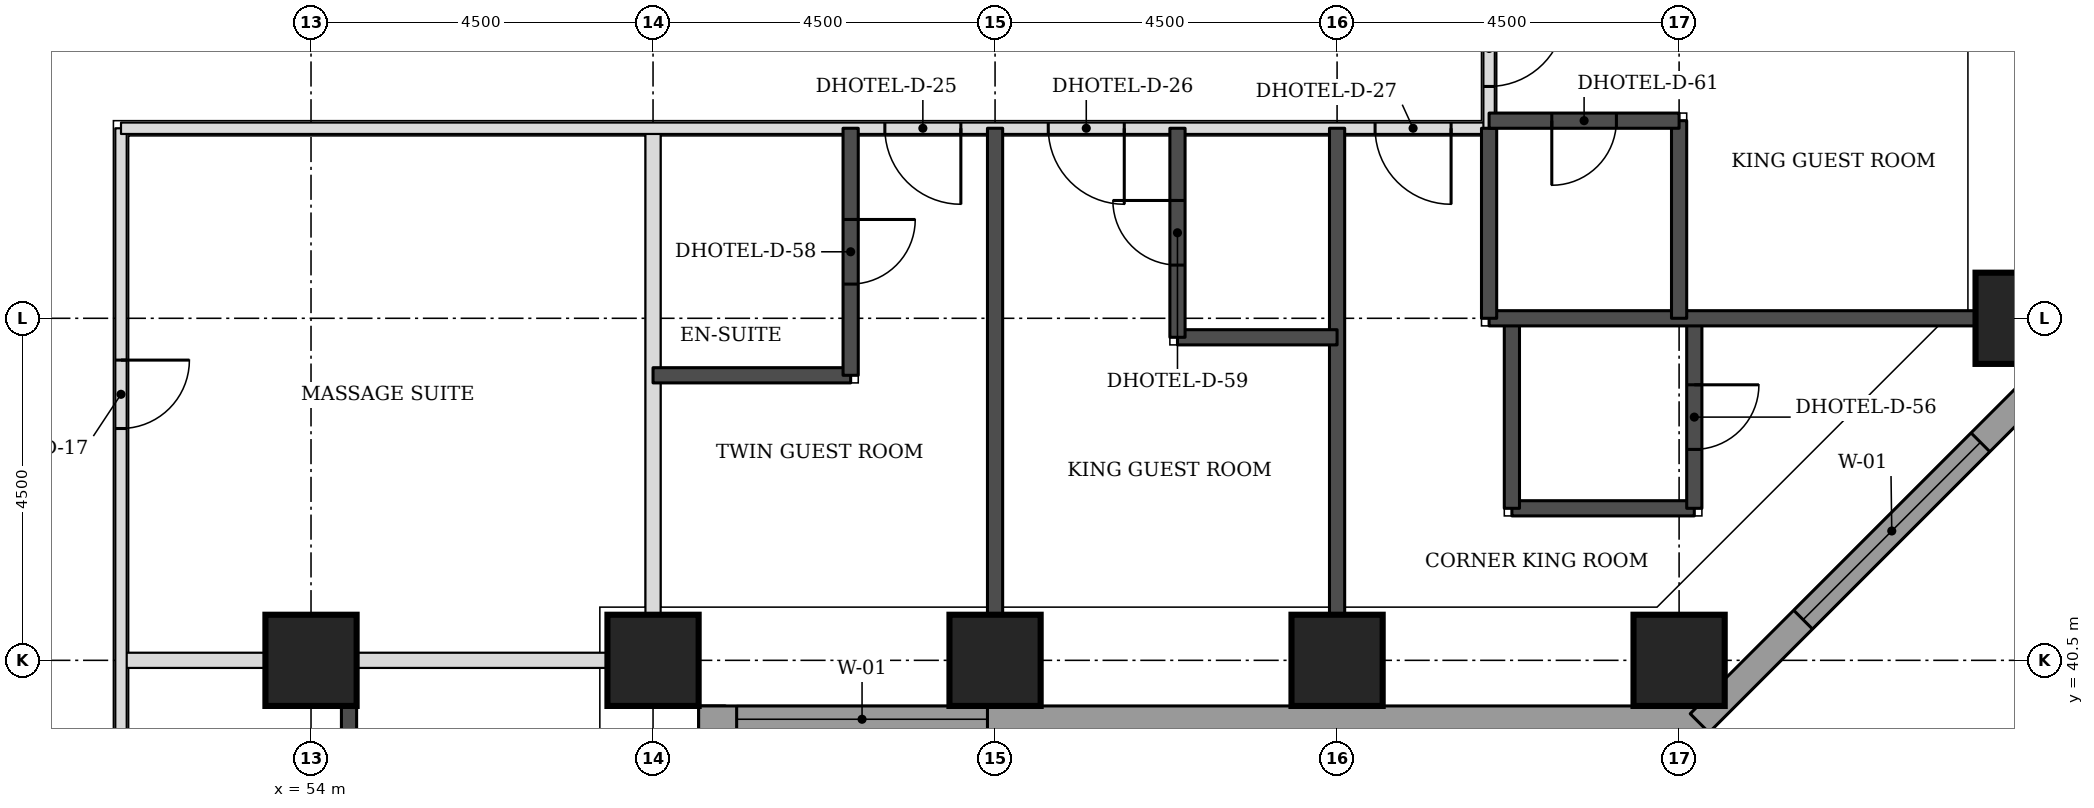
"""IFC4 building model, lengths in metres.
Left out: names, types, materials, properties, quantities, classifications, styles, units other than length and angle.
Written with IfcOpenShell. Run it as: python <this file> out.ifc"""

import sys

from ifc_helpers import new_model, si_unit, direction, frame, frame_2d, origin, origin_2d, place, context, subcontext, project, spatial, rectangle, extrude, element, fill, save


model = new_model("IFC4")
c1 = context("Model", 3, precision=1e-05, world=origin(), true_north=direction((0.0, 1.0)))
c2 = subcontext(c1, "Body", "Model", "MODEL_VIEW")
j1 = project(units=[si_unit("LENGTHUNIT", "METRE"), si_unit("PLANEANGLEUNIT", "RADIAN")], contexts=[c1])
p1 = place(None, origin())
s1 = spatial("IfcSite", under=j1, at=p1, CompositionType="ELEMENT")
p2 = place(p1, origin())
s2 = spatial("IfcBuilding", under=s1, at=p2, CompositionType="ELEMENT")
p3 = place(p2, frame((0.0, 0.0, 59.4)))
s3 = spatial("IfcBuildingStorey", under=s2, at=p3, CompositionType="ELEMENT", Elevation=59.4)
for number, where, z_axis, x_axis in (
    (1, (54.0, 40.5, 0.0), (0.0, 0.0, 1.0), (1.0, 0.0, 0.0)),
    (2, (58.5, 40.5, 0.0), (0.0, 0.0, 1.0), (1.0, 0.0, 0.0)),
    (3, (63.0, 40.5, 0.0), (0.0, 0.0, 1.0), (1.0, 0.0, 0.0)),
    (4, (67.5, 40.5, 0.0), (0.0, 0.0, 1.0), (1.0, 0.0, 0.0)),
    (5, (72.0, 40.5, 0.0), (0.0, 0.0, 1.0), (1.0, 0.0, 0.0)),
    (6, (76.5, 45.0, 0.0), (0.0, 0.0, 1.0), (1.0, 0.0, 0.0)),
):
    element("IfcColumn", number, at=place(p3, frame(where, z_axis=z_axis, x_axis=x_axis)), inside=s3, PredefinedType="COLUMN", context=c2, shape_type="SweptSolid", body=[
        extrude(rectangle(XDim=1.2, YDim=1.2, at=origin_2d()), origin(), (0.0, 0.0, 1.0), 3.3),
    ])
p4 = place(p3, frame((59.275, 22.106, 0.0), z_axis=(0.0, 0.0, 1.0), x_axis=(0.0, 1.0, 0.0)))
e7 = element("IfcWall", 7, at=p4, inside=s3, PredefinedType="STANDARD", context=c2, shape_type="SweptSolid", body=[
    extrude(rectangle(XDim=17.793, YDim=0.35, at=frame_2d((8.897, 0.0))), origin(), (0.0, 0.0, 1.0), 3.055),
])
p5 = place(p4, frame((5.493, 0.0, 0.8)))
e8 = element("IfcOpeningElement", 8, at=p5, cuts=e7, PredefinedType="OPENING", context=c2, shape_type="SweptSolid", body=[
    extrude(rectangle(XDim=3.3, YDim=1.5, at=frame_2d((1.65, 0.75))), frame((0.0, 0.185, 0.0), z_axis=(0.0, -1.0, 0.0), x_axis=(1.0, 0.0, 0.0)), (0.0, 0.0, 1.0), 0.37),
])
p6 = place(p4, frame((13.993, 0.0, 0.8)))
e9 = element("IfcOpeningElement", 9, at=p6, cuts=e7, PredefinedType="OPENING", context=c2, shape_type="SweptSolid", body=[
    extrude(rectangle(XDim=3.3, YDim=1.5, at=frame_2d((1.65, 0.75))), frame((0.0, 0.185, 0.0), z_axis=(0.0, -1.0, 0.0), x_axis=(1.0, 0.0, 0.0)), (0.0, 0.0, 1.0), 0.37),
])
p7 = place(p3, frame((59.1, 39.725, 0.0), z_axis=(0.0, 0.0, 1.0), x_axis=(1.0, 0.0, 0.0)))
e10 = element("IfcWall", 10, at=p7, inside=s3, PredefinedType="STANDARD", context=c2, shape_type="SweptSolid", body=[
    extrude(rectangle(XDim=13.293, YDim=0.35, at=frame_2d((6.647, 0.0))), origin(), (0.0, 0.0, 1.0), 3.055),
])
p8 = place(p7, frame((0.5, 0.0, 0.8)))
e11 = element("IfcOpeningElement", 11, at=p8, cuts=e10, PredefinedType="OPENING", context=c2, shape_type="SweptSolid", body=[
    extrude(rectangle(XDim=3.3, YDim=1.5, at=frame_2d((1.65, 0.75))), frame((0.0, 0.185, 0.0), z_axis=(0.0, -1.0, 0.0), x_axis=(1.0, 0.0, 0.0)), (0.0, 0.0, 1.0), 0.37),
])
p9 = place(p3, frame((72.27, 39.674, 0.0), z_axis=(0.0, 0.0, 1.0), x_axis=(0.707106781187, 0.707106781187, 0.0)))
e12 = element("IfcWall", 12, at=p9, inside=s3, PredefinedType="STANDARD", context=c2, shape_type="SweptSolid", body=[
    extrude(rectangle(XDim=7.151, YDim=0.35, at=frame_2d((3.576, 0.0))), origin(), (0.0, 0.0, 1.0), 3.055),
])
p10 = place(p9, frame((1.926, 0.0, 0.8)))
e13 = element("IfcOpeningElement", 13, at=p10, cuts=e12, PredefinedType="OPENING", context=c2, shape_type="SweptSolid", body=[
    extrude(rectangle(XDim=3.3, YDim=1.5, at=frame_2d((1.65, 0.75))), frame((0.0, 0.185, 0.0), z_axis=(0.0, -1.0, 0.0), x_axis=(1.0, 0.0, 0.0)), (0.0, 0.0, 1.0), 0.37),
])
p11 = place(p3, frame((51.5, 40.5, 0.0), z_axis=(0.0, 0.0, 1.0), x_axis=(1.0, 0.0, 0.0)))
e14 = element("IfcWall", 14, at=p11, inside=s3, PredefinedType="PARTITIONING", context=c2, shape_type="SweptSolid", body=[
    extrude(rectangle(XDim=6.4, YDim=0.2, at=frame_2d((3.2, 0.0))), origin(), (0.0, 0.0, 1.0), 2.33),
])
p12 = place(p3, frame((58.5, 41.1, 0.0), z_axis=(0.0, 0.0, 1.0), x_axis=(0.0, 1.0, 0.0)))
e15 = element("IfcWall", 15, at=p12, inside=s3, PredefinedType="PARTITIONING", context=c2, shape_type="SweptSolid", body=[
    extrude(rectangle(XDim=6.4, YDim=0.2, at=frame_2d((3.2, 0.0))), origin(), (0.0, 0.0, 1.0), 3.08),
])
p13 = place(p3, frame((51.5, 25.15, 0.0), z_axis=(0.0, 0.0, 1.0), x_axis=(0.0, 1.0, 0.0)))
e16 = element("IfcWall", 16, at=p13, inside=s3, PredefinedType="PARTITIONING", context=c2, shape_type="SweptSolid", body=[
    extrude(rectangle(XDim=22.35, YDim=0.15, at=frame_2d((11.175, 0.0))), origin(), (0.0, 0.0, 1.0), 3.08),
])
p14 = place(p13, frame((0.347, 0.0, 0.0)))
e17 = element("IfcOpeningElement", 17, at=p14, cuts=e16, PredefinedType="OPENING", context=c2, shape_type="SweptSolid", body=[
    extrude(rectangle(XDim=1.0, YDim=2.1, at=frame_2d((0.5, 1.05))), frame((0.0, 0.085, 0.0), z_axis=(0.0, -1.0, 0.0), x_axis=(1.0, 0.0, 0.0)), (0.0, 0.0, 1.0), 0.17),
])
p15 = place(p13, frame((2.3, 0.0, 0.0)))
e18 = element("IfcOpeningElement", 18, at=p15, cuts=e16, PredefinedType="OPENING", context=c2, shape_type="SweptSolid", body=[
    extrude(rectangle(XDim=1.0, YDim=2.1, at=frame_2d((0.5, 1.05))), frame((0.0, 0.085, 0.0), z_axis=(0.0, -1.0, 0.0), x_axis=(1.0, 0.0, 0.0)), (0.0, 0.0, 1.0), 0.17),
])
p16 = place(p13, frame((9.15, 0.0, 0.0)))
e19 = element("IfcOpeningElement", 19, at=p16, cuts=e16, PredefinedType="OPENING", context=c2, shape_type="SweptSolid", body=[
    extrude(rectangle(XDim=1.0, YDim=2.1, at=frame_2d((0.5, 1.05))), frame((0.0, 0.085, 0.0), z_axis=(0.0, -1.0, 0.0), x_axis=(1.0, 0.0, 0.0)), (0.0, 0.0, 1.0), 0.17),
])
p17 = place(p13, frame((11.3, 0.0, 0.0)))
e20 = element("IfcOpeningElement", 20, at=p17, cuts=e16, PredefinedType="OPENING", context=c2, shape_type="SweptSolid", body=[
    extrude(rectangle(XDim=1.0, YDim=2.1, at=frame_2d((0.5, 1.05))), frame((0.0, 0.085, 0.0), z_axis=(0.0, -1.0, 0.0), x_axis=(1.0, 0.0, 0.0)), (0.0, 0.0, 1.0), 0.17),
])
p18 = place(p13, frame((18.4, 0.0, 0.0)))
e21 = element("IfcOpeningElement", 21, at=p18, cuts=e16, PredefinedType="OPENING", context=c2, shape_type="SweptSolid", body=[
    extrude(rectangle(XDim=0.9, YDim=2.1, at=frame_2d((0.45, 1.05))), frame((0.0, 0.085, 0.0), z_axis=(0.0, -1.0, 0.0), x_axis=(1.0, 0.0, 0.0)), (0.0, 0.0, 1.0), 0.17),
])
p19 = place(p3, frame((51.5, 47.5, 0.0), z_axis=(0.0, 0.0, 1.0), x_axis=(1.0, 0.0, 0.0)))
e22 = element("IfcWall", 22, at=p19, inside=s3, PredefinedType="PARTITIONING", context=c2, shape_type="SweptSolid", body=[
    extrude(rectangle(XDim=18.0, YDim=0.15, at=frame_2d((9.0, 0.0))), origin(), (0.0, 0.0, 1.0), 3.08),
])
p20 = place(p19, frame((12.2, 0.0, 0.0)))
e23 = element("IfcOpeningElement", 23, at=p20, cuts=e22, PredefinedType="OPENING", context=c2, shape_type="SweptSolid", body=[
    extrude(rectangle(XDim=1.0, YDim=2.1, at=frame_2d((0.5, 1.05))), frame((0.0, 0.085, 0.0), z_axis=(0.0, -1.0, 0.0), x_axis=(1.0, 0.0, 0.0)), (0.0, 0.0, 1.0), 0.17),
])
p21 = place(p19, frame((10.05, 0.0, 0.0)))
e24 = element("IfcOpeningElement", 24, at=p21, cuts=e22, PredefinedType="OPENING", context=c2, shape_type="SweptSolid", body=[
    extrude(rectangle(XDim=1.0, YDim=2.1, at=frame_2d((0.5, 1.05))), frame((0.0, 0.085, 0.0), z_axis=(0.0, -1.0, 0.0), x_axis=(1.0, 0.0, 0.0)), (0.0, 0.0, 1.0), 0.17),
])
p22 = place(p19, frame((16.5, 0.0, 0.0)))
e25 = element("IfcOpeningElement", 25, at=p22, cuts=e22, PredefinedType="OPENING", context=c2, shape_type="SweptSolid", body=[
    extrude(rectangle(XDim=1.0, YDim=2.1, at=frame_2d((0.5, 1.05))), frame((0.0, 0.085, 0.0), z_axis=(0.0, -1.0, 0.0), x_axis=(1.0, 0.0, 0.0)), (0.0, 0.0, 1.0), 0.17),
])
p23 = place(p3, frame((69.5, 47.5, 0.0), z_axis=(0.0, 0.0, 1.0), x_axis=(0.0, 1.0, 0.0)))
e26 = element("IfcWall", 26, at=p23, inside=s3, PredefinedType="PARTITIONING", context=c2, shape_type="SweptSolid", body=[
    extrude(rectangle(XDim=26.5, YDim=0.15, at=frame_2d((13.25, 0.0))), origin(), (0.0, 0.0, 1.0), 3.08),
])
p24 = place(p23, frame((22.65, 0.0, 0.0)))
e27 = element("IfcOpeningElement", 27, at=p24, cuts=e26, PredefinedType="OPENING", context=c2, shape_type="SweptSolid", body=[
    extrude(rectangle(XDim=1.0, YDim=2.1, at=frame_2d((0.5, 1.05))), frame((0.0, 0.085, 0.0), z_axis=(0.0, -1.0, 0.0), x_axis=(1.0, 0.0, 0.0)), (0.0, 0.0, 1.0), 0.17),
])
p25 = place(p23, frame((16.6, 0.0, 0.0)))
e28 = element("IfcOpeningElement", 28, at=p25, cuts=e26, PredefinedType="OPENING", context=c2, shape_type="SweptSolid", body=[
    extrude(rectangle(XDim=1.0, YDim=2.1, at=frame_2d((0.5, 1.05))), frame((0.0, 0.085, 0.0), z_axis=(0.0, -1.0, 0.0), x_axis=(1.0, 0.0, 0.0)), (0.0, 0.0, 1.0), 0.17),
])
p26 = place(p23, frame((4.25, 0.0, 0.0)))
e29 = element("IfcOpeningElement", 29, at=p26, cuts=e26, PredefinedType="OPENING", context=c2, shape_type="SweptSolid", body=[
    extrude(rectangle(XDim=1.1, YDim=2.1, at=frame_2d((0.55, 1.05))), frame((0.0, 0.085, 0.0), z_axis=(0.0, -1.0, 0.0), x_axis=(1.0, 0.0, 0.0)), (0.0, 0.0, 1.0), 0.17),
])
p27 = place(p23, frame((0.55, 0.0, 0.0)))
e30 = element("IfcOpeningElement", 30, at=p27, cuts=e26, PredefinedType="OPENING", context=c2, shape_type="SweptSolid", body=[
    extrude(rectangle(XDim=1.0, YDim=2.1, at=frame_2d((0.5, 1.05))), frame((0.0, 0.085, 0.0), z_axis=(0.0, -1.0, 0.0), x_axis=(1.0, 0.0, 0.0)), (0.0, 0.0, 1.0), 0.17),
])
p28 = place(p3, frame((54.5, 37.9, 0.0), z_axis=(0.0, 0.0, 1.0), x_axis=(0.0, 1.0, 0.0)))
e31 = element("IfcWall", 31, at=p28, inside=s3, PredefinedType="SOLIDWALL", context=c2, shape_type="SweptSolid", body=[
    extrude(rectangle(XDim=2.6, YDim=0.2, at=frame_2d((1.3, 0.0))), origin(), (0.0, 0.0, 1.0), 3.08),
])
for number, where, z_axis, x_axis in (
    (32, (63.0, 41.1, 0.0), (0.0, 0.0, 1.0), (0.0, 1.0, 0.0)),
    (33, (67.5, 41.1, 0.0), (0.0, 0.0, 1.0), (0.0, 1.0, 0.0)),
):
    element("IfcWall", number, at=place(p3, frame(where, z_axis=z_axis, x_axis=x_axis)), inside=s3, PredefinedType="SOLIDWALL", context=c2, shape_type="SweptSolid", body=[
        extrude(rectangle(XDim=6.4, YDim=0.2, at=frame_2d((3.2, 0.0))), origin(), (0.0, 0.0, 1.0), 3.08),
    ])
p29 = place(p3, frame((69.8, 42.5, 0.0), z_axis=(0.0, 0.0, 1.0), x_axis=(1.0, 0.0, 0.0)))
e34 = element("IfcWall", 34, at=p29, inside=s3, PredefinedType="SOLIDWALL", context=c2, shape_type="SweptSolid", body=[
    extrude(rectangle(XDim=2.4, YDim=0.2, at=frame_2d((1.2, 0.0))), origin(), (0.0, 0.0, 1.0), 3.08),
])
p30 = place(p3, frame((69.8, 42.5, 0.0), z_axis=(0.0, 0.0, 1.0), x_axis=(0.0, 1.0, 0.0)))
e35 = element("IfcWall", 35, at=p30, inside=s3, PredefinedType="SOLIDWALL", context=c2, shape_type="SweptSolid", body=[
    extrude(rectangle(XDim=2.5, YDim=0.2, at=frame_2d((1.25, 0.0))), origin(), (0.0, 0.0, 1.0), 3.08),
])
p31 = place(p3, frame((72.2, 42.5, 0.0), z_axis=(0.0, 0.0, 1.0), x_axis=(0.0, 1.0, 0.0)))
e36 = element("IfcWall", 36, at=p31, inside=s3, PredefinedType="SOLIDWALL", context=c2, shape_type="SweptSolid", body=[
    extrude(rectangle(XDim=2.5, YDim=0.2, at=frame_2d((1.25, 0.0))), origin(), (0.0, 0.0, 1.0), 3.08),
])
p32 = place(p31, frame((0.775, 0.0, 0.0)))
e37 = element("IfcOpeningElement", 37, at=p32, cuts=e36, PredefinedType="OPENING", context=c2, shape_type="SweptSolid", body=[
    extrude(rectangle(XDim=0.85, YDim=2.1, at=frame_2d((0.425, 1.05))), frame((0.0, 0.11, 0.0), z_axis=(0.0, -1.0, 0.0), x_axis=(1.0, 0.0, 0.0)), (0.0, 0.0, 1.0), 0.22),
])
p33 = place(p3, frame((58.5, 44.25, 0.0), z_axis=(0.0, 0.0, 1.0), x_axis=(1.0, 0.0, 0.0)))
e38 = element("IfcWall", 38, at=p33, inside=s3, PredefinedType="SOLIDWALL", context=c2, shape_type="SweptSolid", body=[
    extrude(rectangle(XDim=2.6, YDim=0.2, at=frame_2d((1.3, 0.0))), origin(), (0.0, 0.0, 1.0), 3.08),
])
p34 = place(p3, frame((61.1, 44.25, 0.0), z_axis=(0.0, 0.0, 1.0), x_axis=(0.0, 1.0, 0.0)))
e39 = element("IfcWall", 39, at=p34, inside=s3, PredefinedType="SOLIDWALL", context=c2, shape_type="SweptSolid", body=[
    extrude(rectangle(XDim=3.25, YDim=0.2, at=frame_2d((1.625, 0.0))), origin(), (0.0, 0.0, 1.0), 3.08),
])
p35 = place(p34, frame((1.2, 0.0, 0.0)))
e40 = element("IfcOpeningElement", 40, at=p35, cuts=e39, PredefinedType="OPENING", context=c2, shape_type="SweptSolid", body=[
    extrude(rectangle(XDim=0.85, YDim=2.1, at=frame_2d((0.425, 1.05))), frame((0.0, 0.11, 0.0), z_axis=(0.0, -1.0, 0.0), x_axis=(1.0, 0.0, 0.0)), (0.0, 0.0, 1.0), 0.22),
])
p36 = place(p3, frame((65.4, 44.75, 0.0), z_axis=(0.0, 0.0, 1.0), x_axis=(1.0, 0.0, 0.0)))
e41 = element("IfcWall", 41, at=p36, inside=s3, PredefinedType="SOLIDWALL", context=c2, shape_type="SweptSolid", body=[
    extrude(rectangle(XDim=2.1, YDim=0.2, at=frame_2d((1.05, 0.0))), origin(), (0.0, 0.0, 1.0), 3.08),
])
p37 = place(p3, frame((65.4, 44.75, 0.0), z_axis=(0.0, 0.0, 1.0), x_axis=(0.0, 1.0, 0.0)))
e42 = element("IfcWall", 42, at=p37, inside=s3, PredefinedType="SOLIDWALL", context=c2, shape_type="SweptSolid", body=[
    extrude(rectangle(XDim=2.75, YDim=0.2, at=frame_2d((1.375, 0.0))), origin(), (0.0, 0.0, 1.0), 3.08),
])
p38 = place(p37, frame((0.95, 0.0, 0.0)))
e43 = element("IfcOpeningElement", 43, at=p38, cuts=e42, PredefinedType="OPENING", context=c2, shape_type="SweptSolid", body=[
    extrude(rectangle(XDim=0.85, YDim=2.1, at=frame_2d((0.425, 1.05))), frame((0.0, 0.11, 0.0), z_axis=(0.0, -1.0, 0.0), x_axis=(1.0, 0.0, 0.0)), (0.0, 0.0, 1.0), 0.22),
])
p39 = place(p3, frame((69.5, 45.0, 0.0), z_axis=(0.0, 0.0, 1.0), x_axis=(1.0, 0.0, 0.0)))
e44 = element("IfcWall", 44, at=p39, inside=s3, PredefinedType="SOLIDWALL", context=c2, shape_type="SweptSolid", body=[
    extrude(rectangle(XDim=6.4, YDim=0.2, at=frame_2d((3.2, 0.0))), origin(), (0.0, 0.0, 1.0), 3.08),
])
p40 = place(p3, frame((69.5, 45.0, 0.0), z_axis=(0.0, 0.0, 1.0), x_axis=(0.0, 1.0, 0.0)))
e45 = element("IfcWall", 45, at=p40, inside=s3, PredefinedType="SOLIDWALL", context=c2, shape_type="SweptSolid", body=[
    extrude(rectangle(XDim=2.5, YDim=0.2, at=frame_2d((1.25, 0.0))), origin(), (0.0, 0.0, 1.0), 3.08),
])
p41 = place(p3, frame((72.0, 45.0, 0.0), z_axis=(0.0, 0.0, 1.0), x_axis=(0.0, 1.0, 0.0)))
e46 = element("IfcWall", 46, at=p41, inside=s3, PredefinedType="SOLIDWALL", context=c2, shape_type="SweptSolid", body=[
    extrude(rectangle(XDim=2.6, YDim=0.2, at=frame_2d((1.3, 0.0))), origin(), (0.0, 0.0, 1.0), 3.08),
])
p42 = place(p3, frame((69.5, 47.6, 0.0), z_axis=(0.0, 0.0, 1.0), x_axis=(1.0, 0.0, 0.0)))
e47 = element("IfcWall", 47, at=p42, inside=s3, PredefinedType="SOLIDWALL", context=c2, shape_type="SweptSolid", body=[
    extrude(rectangle(XDim=2.5, YDim=0.2, at=frame_2d((1.25, 0.0))), origin(), (0.0, 0.0, 1.0), 3.08),
])
p43 = place(p42, frame((0.825, 0.0, 0.0)))
e48 = element("IfcOpeningElement", 48, at=p43, cuts=e47, PredefinedType="OPENING", context=c2, shape_type="SweptSolid", body=[
    extrude(rectangle(XDim=0.85, YDim=2.1, at=frame_2d((0.425, 1.05))), frame((0.0, 0.11, 0.0), z_axis=(0.0, -1.0, 0.0), x_axis=(1.0, 0.0, 0.0)), (0.0, 0.0, 1.0), 0.22),
])
p44 = place(p8, origin())
e49 = element("IfcWindow", 49, at=p44, inside=s3, PartitioningType="SINGLE_PANEL", PredefinedType="WINDOW", context=c2, shape_type="SweptSolid", body=[
    extrude(rectangle(XDim=3.3, YDim=1.5, at=frame_2d((1.65, 0.75))), frame((0.0, 0.085, 0.0), z_axis=(0.0, -1.0, 0.0), x_axis=(1.0, 0.0, 0.0)), (0.0, 0.0, 1.0), 0.06),
])
fill(e11, e49)
p45 = place(p10, origin())
e50 = element("IfcWindow", 50, at=p45, inside=s3, PartitioningType="SINGLE_PANEL", PredefinedType="WINDOW", context=c2, shape_type="SweptSolid", body=[
    extrude(rectangle(XDim=3.3, YDim=1.5, at=frame_2d((1.65, 0.75))), frame((0.0, 0.085, 0.0), z_axis=(0.0, -1.0, 0.0), x_axis=(1.0, 0.0, 0.0)), (0.0, 0.0, 1.0), 0.06),
])
fill(e13, e50)
p46 = place(p27, frame((1.0, 0.0, 0.0), z_axis=(0.0, 0.0, 1.0), x_axis=(-1.0, 0.0, 0.0)))
e51 = element("IfcDoor", 51, at=p46, inside=s3, OperationType="SINGLE_SWING_LEFT", PredefinedType="DOOR", context=c2, shape_type="SweptSolid", body=[
    extrude(rectangle(XDim=1.0, YDim=2.1, at=frame_2d((0.5, 1.05))), frame((0.0, 0.025, 0.0), z_axis=(0.0, -1.0, 0.0), x_axis=(1.0, 0.0, 0.0)), (0.0, 0.0, 1.0), 0.05),
])
fill(e30, e51)
p47 = place(p43, frame((0.85, 0.0, 0.0), z_axis=(0.0, 0.0, 1.0), x_axis=(-1.0, 0.0, 0.0)))
e52 = element("IfcDoor", 52, at=p47, inside=s3, OperationType="SINGLE_SWING_RIGHT", PredefinedType="DOOR", context=c2, shape_type="SweptSolid", body=[
    extrude(rectangle(XDim=0.85, YDim=2.1, at=frame_2d((0.425, 1.05))), frame((0.0, 0.025, 0.0), z_axis=(0.0, -1.0, 0.0), x_axis=(1.0, 0.0, 0.0)), (0.0, 0.0, 1.0), 0.05),
])
fill(e48, e52)
p48 = place(p20, frame((1.0, 0.0, 0.0), z_axis=(0.0, 0.0, 1.0), x_axis=(-1.0, 0.0, 0.0)))
e53 = element("IfcDoor", 53, at=p48, inside=s3, OperationType="SINGLE_SWING_LEFT", PredefinedType="DOOR", context=c2, shape_type="SweptSolid", body=[
    extrude(rectangle(XDim=1.0, YDim=2.1, at=frame_2d((0.5, 1.05))), frame((0.0, 0.025, 0.0), z_axis=(0.0, -1.0, 0.0), x_axis=(1.0, 0.0, 0.0)), (0.0, 0.0, 1.0), 0.05),
])
fill(e23, e53)
p49 = place(p38, origin())
e54 = element("IfcDoor", 54, at=p49, inside=s3, OperationType="SINGLE_SWING_RIGHT", PredefinedType="DOOR", context=c2, shape_type="SweptSolid", body=[
    extrude(rectangle(XDim=0.85, YDim=2.1, at=frame_2d((0.425, 1.05))), frame((0.0, 0.025, 0.0), z_axis=(0.0, -1.0, 0.0), x_axis=(1.0, 0.0, 0.0)), (0.0, 0.0, 1.0), 0.05),
])
fill(e43, e54)
p50 = place(p21, frame((1.0, 0.0, 0.0), z_axis=(0.0, 0.0, 1.0), x_axis=(-1.0, 0.0, 0.0)))
e55 = element("IfcDoor", 55, at=p50, inside=s3, OperationType="SINGLE_SWING_LEFT", PredefinedType="DOOR", context=c2, shape_type="SweptSolid", body=[
    extrude(rectangle(XDim=1.0, YDim=2.1, at=frame_2d((0.5, 1.05))), frame((0.0, 0.025, 0.0), z_axis=(0.0, -1.0, 0.0), x_axis=(1.0, 0.0, 0.0)), (0.0, 0.0, 1.0), 0.05),
])
fill(e24, e55)
p51 = place(p35, frame((0.85, 0.0, 0.0), z_axis=(0.0, 0.0, 1.0), x_axis=(-1.0, 0.0, 0.0)))
e56 = element("IfcDoor", 56, at=p51, inside=s3, OperationType="SINGLE_SWING_LEFT", PredefinedType="DOOR", context=c2, shape_type="SweptSolid", body=[
    extrude(rectangle(XDim=0.85, YDim=2.1, at=frame_2d((0.425, 1.05))), frame((0.0, 0.025, 0.0), z_axis=(0.0, -1.0, 0.0), x_axis=(1.0, 0.0, 0.0)), (0.0, 0.0, 1.0), 0.05),
])
fill(e40, e56)
p52 = place(p22, frame((1.0, 0.0, 0.0), z_axis=(0.0, 0.0, 1.0), x_axis=(-1.0, 0.0, 0.0)))
e57 = element("IfcDoor", 57, at=p52, inside=s3, OperationType="SINGLE_SWING_LEFT", PredefinedType="DOOR", context=c2, shape_type="SweptSolid", body=[
    extrude(rectangle(XDim=1.0, YDim=2.1, at=frame_2d((0.5, 1.05))), frame((0.0, 0.025, 0.0), z_axis=(0.0, -1.0, 0.0), x_axis=(1.0, 0.0, 0.0)), (0.0, 0.0, 1.0), 0.05),
])
fill(e25, e57)
p53 = place(p32, frame((0.85, 0.0, 0.0), z_axis=(0.0, 0.0, 1.0), x_axis=(-1.0, 0.0, 0.0)))
e58 = element("IfcDoor", 58, at=p53, inside=s3, OperationType="SINGLE_SWING_LEFT", PredefinedType="DOOR", context=c2, shape_type="SweptSolid", body=[
    extrude(rectangle(XDim=0.85, YDim=2.1, at=frame_2d((0.425, 1.05))), frame((0.0, 0.025, 0.0), z_axis=(0.0, -1.0, 0.0), x_axis=(1.0, 0.0, 0.0)), (0.0, 0.0, 1.0), 0.05),
])
fill(e37, e58)
p54 = place(p18, frame((0.9, 0.0, 0.0), z_axis=(0.0, 0.0, 1.0), x_axis=(-1.0, 0.0, 0.0)))
e59 = element("IfcDoor", 59, at=p54, inside=s3, OperationType="SINGLE_SWING_LEFT", PredefinedType="DOOR", context=c2, shape_type="SweptSolid", body=[
    extrude(rectangle(XDim=0.9, YDim=2.1, at=frame_2d((0.45, 1.05))), frame((0.0, 0.025, 0.0), z_axis=(0.0, -1.0, 0.0), x_axis=(1.0, 0.0, 0.0)), (0.0, 0.0, 1.0), 0.05),
])
fill(e21, e59)
save(model, sys.argv[1])
